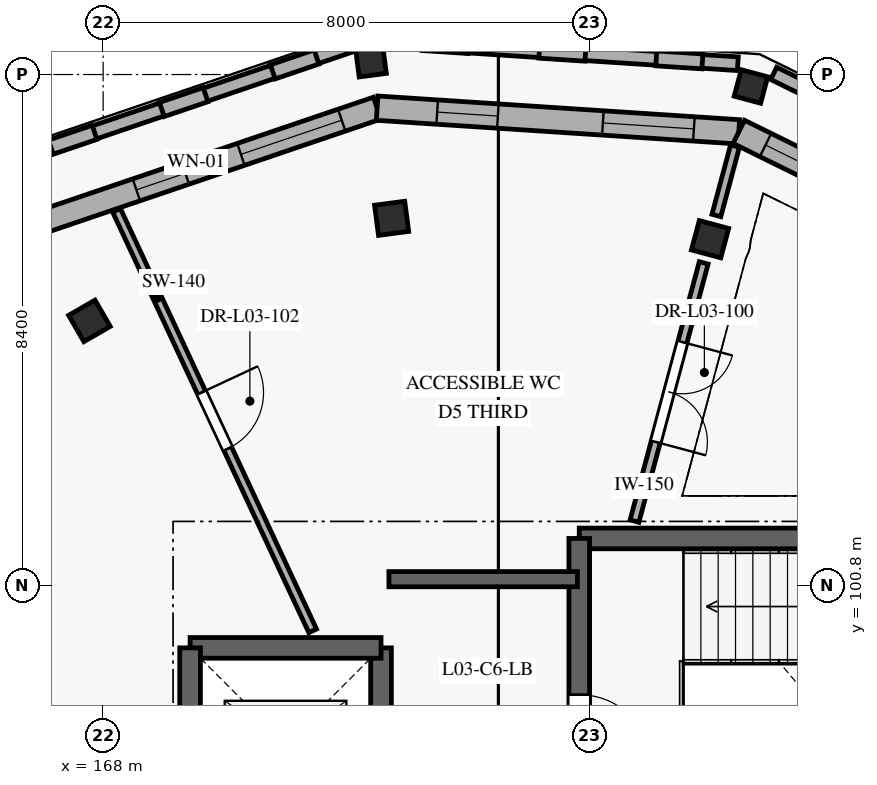
"""IFC4 building model, lengths in metres.
Left out: names, types, materials, properties, quantities, classifications, styles, units other than length and angle.
Written with IfcOpenShell. Run it as: python <this file> out.ifc"""

import sys

from ifc_helpers import new_model, si_unit, direction, frame, frame_2d, origin, origin_2d, place, context, subcontext, project, spatial, rectangle, extrude, element, fill, save


model = new_model("IFC4")
c1 = context("Model", 3, precision=1e-05, world=origin(), true_north=direction((0.0, 1.0)))
c2 = subcontext(c1, "Body", "Model", "MODEL_VIEW")
j1 = project(units=[si_unit("LENGTHUNIT", "METRE"), si_unit("PLANEANGLEUNIT", "RADIAN")], contexts=[c1])
p1 = place(None, origin())
s1 = spatial("IfcSite", under=j1, at=p1, CompositionType="ELEMENT")
p2 = place(p1, origin())
s2 = spatial("IfcBuilding", under=s1, at=p2, CompositionType="ELEMENT")
p3 = place(p2, frame((0.0, 0.0, 12.6)))
s3 = spatial("IfcBuildingStorey", under=s2, at=p3, CompositionType="ELEMENT", Elevation=12.6)
for number, where, z_axis, x_axis in (
    (1, (178.654, 109.003, 0.0), (0.0, 0.0, 1.0), (-0.966, 0.259, 0.0)),
    (2, (172.405, 109.413, 0.0), (0.0, 0.0, 1.0), (-0.991, -0.131, 0.0)),
):
    element("IfcColumn", number, at=place(p3, frame(where, z_axis=z_axis, x_axis=x_axis)), inside=s3, PredefinedType="COLUMN", context=c2, shape_type="SweptSolid", body=[
        extrude(rectangle(XDim=0.45, YDim=0.45, at=origin_2d()), origin(), (0.0, 0.0, 1.0), 4.2),
    ])
for number, where, z_axis, x_axis in (
    (3, (177.981, 106.492, 0.0), (0.0, 0.0, 1.0), (-0.966, 0.259, 0.0)),
    (4, (172.744, 106.835, 0.0), (0.0, 0.0, 1.0), (-0.991, -0.131, 0.0)),
    (5, (167.775, 105.148, 0.0), (0.0, 0.0, 1.0), (-0.866, -0.5, 0.0)),
):
    element("IfcColumn", number, at=place(p3, frame(where, z_axis=z_axis, x_axis=x_axis)), inside=s3, PredefinedType="COLUMN", context=c2, shape_type="SweptSolid", body=[
        extrude(rectangle(XDim=0.5, YDim=0.5, at=origin_2d()), origin(), (0.0, 0.0, 1.0), 4.2),
    ])
p4 = place(p3, frame((166.861, 106.731, 0.0), z_axis=(0.0, 0.0, 1.0), x_axis=(0.94693663561, 0.321420298269, 0.0)))
e6 = element("IfcWall", 6, at=p4, inside=s3, PredefinedType="SOLIDWALL", context=c2, shape_type="SweptSolid", body=[
    extrude(rectangle(XDim=5.961, YDim=0.38, at=frame_2d((2.98, 0.0))), origin(), (0.0, 0.0, 1.0), 3.94),
])
p5 = place(p4, frame((1.781, 0.0, 0.85)))
e7 = element("IfcOpeningElement", 7, at=p5, cuts=e6, PredefinedType="OPENING", context=c2, shape_type="SweptSolid", body=[
    extrude(rectangle(XDim=0.85, YDim=1.4, at=frame_2d((0.425, 0.7))), frame((0.0, 0.2, 0.0), z_axis=(0.0, -1.0, 0.0), x_axis=(1.0, 0.0, 0.0)), (0.0, 0.0, 1.0), 0.4),
])
p6 = place(p4, frame((3.596, 0.0, 0.85)))
e8 = element("IfcOpeningElement", 8, at=p6, cuts=e6, PredefinedType="OPENING", context=c2, shape_type="SweptSolid", body=[
    extrude(rectangle(XDim=1.75, YDim=1.3, at=frame_2d((0.875, 0.65))), frame((0.0, 0.2, 0.0), z_axis=(0.0, -1.0, 0.0), x_axis=(1.0, 0.0, 0.0)), (0.0, 0.0, 1.0), 0.4),
])
p7 = place(p3, frame((172.506, 108.647, 0.0), z_axis=(0.0, 0.0, 1.0), x_axis=(0.997858658418, -0.065407169492, 0.0)))
e9 = element("IfcWall", 9, at=p7, inside=s3, PredefinedType="SOLIDWALL", context=c2, shape_type="SweptSolid", body=[
    extrude(rectangle(XDim=5.961, YDim=0.4, at=frame_2d((2.98, 0.0))), origin(), (0.0, 0.0, 1.0), 3.94),
])
p8 = place(p7, frame((0.99, 0.0, 0.85)))
e10 = element("IfcOpeningElement", 10, at=p8, cuts=e9, PredefinedType="OPENING", context=c2, shape_type="SweptSolid", body=[
    extrude(rectangle(XDim=1.0, YDim=1.3, at=frame_2d((0.5, 0.65))), frame((0.0, 0.21, 0.0), z_axis=(0.0, -1.0, 0.0), x_axis=(1.0, 0.0, 0.0)), (0.0, 0.0, 1.0), 0.42),
])
p9 = place(p7, frame((3.721, 0.0, 0.85)))
e11 = element("IfcOpeningElement", 11, at=p9, cuts=e9, PredefinedType="OPENING", context=c2, shape_type="SweptSolid", body=[
    extrude(rectangle(XDim=1.5, YDim=1.3, at=frame_2d((0.75, 0.65))), frame((0.0, 0.21, 0.0), z_axis=(0.0, -1.0, 0.0), x_axis=(1.0, 0.0, 0.0)), (0.0, 0.0, 1.0), 0.42),
])
p10 = place(p3, frame((178.454, 108.257, 0.0), z_axis=(0.0, 0.0, 1.0), x_axis=(0.896879104746, -0.442275786664, 0.0)))
e12 = element("IfcWall", 12, at=p10, inside=s3, PredefinedType="SOLIDWALL", context=c2, shape_type="SweptSolid", body=[
    extrude(rectangle(XDim=5.961, YDim=0.425, at=frame_2d((2.98, 0.0))), origin(), (0.0, 0.0, 1.0), 3.94),
])
p11 = place(p10, frame((0.49, 0.0, 0.85)))
e13 = element("IfcOpeningElement", 13, at=p11, cuts=e12, PredefinedType="OPENING", context=c2, shape_type="SweptSolid", body=[
    extrude(rectangle(XDim=2.0, YDim=1.3, at=frame_2d((1.0, 0.65))), frame((0.0, 0.222, 0.0), z_axis=(0.0, -1.0, 0.0), x_axis=(1.0, 0.0, 0.0)), (0.0, 0.0, 1.0), 0.445),
])
p12 = place(p10, frame((3.346, 0.0, 0.85)))
e14 = element("IfcOpeningElement", 14, at=p12, cuts=e12, PredefinedType="OPENING", context=c2, shape_type="SweptSolid", body=[
    extrude(rectangle(XDim=2.25, YDim=1.3, at=frame_2d((1.125, 0.65))), frame((0.0, 0.222, 0.0), z_axis=(0.0, -1.0, 0.0), x_axis=(1.0, 0.0, 0.0)), (0.0, 0.0, 1.0), 0.445),
])
p13 = place(p3, frame((184.215, 106.662, 0.0), z_axis=(0.0, 0.0, 1.0), x_axis=(-0.896862382364, 0.442309695915, 0.0)))
e15 = element("IfcWall", 15, at=p13, inside=s3, PredefinedType="ELEMENTEDWALL", context=c2, shape_type="SweptSolid", body=[
    extrude(rectangle(XDim=5.783, YDim=0.225, at=frame_2d((2.892, 0.0))), origin(), (0.0, 0.0, 1.0), 1.09),
])
p14 = place(p3, frame((178.438, 109.377, 0.0), z_axis=(0.0, 0.0, 1.0), x_axis=(-0.997859072584, 0.065400850615, 0.0)))
e16 = element("IfcWall", 16, at=p14, inside=s3, PredefinedType="ELEMENTEDWALL", context=c2, shape_type="SweptSolid", body=[
    extrude(rectangle(XDim=5.782, YDim=0.225, at=frame_2d((2.891, 0.0))), origin(), (0.0, 0.0, 1.0), 1.09),
])
for number, where, z_axis, x_axis in (
    (17, (177.855, 109.416, 1.09), (0.0, 0.0, 1.0), (-0.998, 0.065, 0.0)),
    (18, (175.932, 109.542, 1.09), (0.0, 0.0, 1.0), (-0.998, 0.066, 0.0)),
    (19, (174.009, 109.668, 1.09), (0.0, 0.0, 1.0), (-0.998, 0.066, 0.0)),
):
    element("IfcWall", number, at=place(p3, frame(where, z_axis=z_axis, x_axis=x_axis)), inside=s3, PredefinedType="ELEMENTEDWALL", context=c2, shape_type="SweptSolid", body=[
        extrude(rectangle(XDim=0.76, YDim=0.245, at=frame_2d((0.38, 0.0))), origin(), (0.0, 0.0, 1.0), 2.85),
    ])
p15 = place(p3, frame((172.062, 109.676, 0.0), z_axis=(0.0, 0.0, 1.0), x_axis=(-0.946942218197, -0.321403850935, 0.0)))
e20 = element("IfcWall", 20, at=p15, inside=s3, PredefinedType="ELEMENTEDWALL", context=c2, shape_type="SweptSolid", body=[
    extrude(rectangle(XDim=5.782, YDim=0.225, at=frame_2d((2.891, 0.0))), origin(), (0.0, 0.0, 1.0), 1.09),
])
for number, where, z_axis, x_axis in (
    (21, (171.51, 109.488, 1.09), (0.0, 0.0, 1.0), (-0.947, -0.322, 0.0)),
    (22, (169.684, 108.869, 1.09), (0.0, 0.0, 1.0), (-0.947, -0.321, 0.0)),
    (23, (167.859, 108.249, 1.09), (0.0, 0.0, 1.0), (-0.947, -0.322, 0.0)),
):
    element("IfcWall", number, at=place(p3, frame(where, z_axis=z_axis, x_axis=x_axis)), inside=s3, PredefinedType="ELEMENTEDWALL", context=c2, shape_type="SweptSolid", body=[
        extrude(rectangle(XDim=0.76, YDim=0.245, at=frame_2d((0.38, 0.0))), origin(), (0.0, 0.0, 1.0), 2.85),
    ])
p16 = place(p3, frame((182.77, 101.57, 0.0), z_axis=(0.0, 0.0, 1.0), x_axis=(-1.0, 0.0, 0.0)))
e24 = element("IfcWall", 24, at=p16, inside=s3, PredefinedType="SHEAR", context=c2, shape_type="SweptSolid", body=[
    extrude(rectangle(XDim=6.94, YDim=0.34, at=frame_2d((3.47, 0.0))), origin(), (0.0, 0.0, 1.0), 3.95),
])
p17 = place(p3, frame((175.83, 101.57, 0.0), z_axis=(0.0, 0.0, 1.0), x_axis=(0.0, -1.0, 0.0)))
e25 = element("IfcWall", 25, at=p17, inside=s3, PredefinedType="SHEAR", context=c2, shape_type="SweptSolid", body=[
    extrude(rectangle(XDim=6.34, YDim=0.34, at=frame_2d((3.17, 0.0))), origin(), (0.0, 0.0, 1.0), 3.95),
])
p18 = place(p17, frame((2.57, 0.0, 0.0)))
e26 = element("IfcOpeningElement", 26, at=p18, cuts=e25, PredefinedType="OPENING", context=c2, shape_type="SweptSolid", body=[
    extrude(rectangle(XDim=1.2, YDim=2.1, at=frame_2d((0.6, 1.05))), frame((0.0, 0.18, 0.0), z_axis=(0.0, -1.0, 0.0), x_axis=(1.0, 0.0, 0.0)), (0.0, 0.0, 1.0), 0.36),
])
p19 = place(p3, frame((172.57, 96.63, 0.0), z_axis=(0.0, 0.0, 1.0), x_axis=(0.0, 1.0, 0.0)))
e27 = element("IfcWall", 27, at=p19, inside=s3, PredefinedType="SHEAR", context=c2, shape_type="SweptSolid", body=[
    extrude(rectangle(XDim=3.14, YDim=0.34, at=frame_2d((1.57, 0.0))), origin(), (0.0, 0.0, 1.0), 3.95),
])
p20 = place(p19, frame((1.02, 0.0, 0.0)))
e28 = element("IfcOpeningElement", 28, at=p20, cuts=e27, PredefinedType="OPENING", context=c2, shape_type="SweptSolid", body=[
    extrude(rectangle(XDim=1.1, YDim=2.1, at=frame_2d((0.55, 1.05))), frame((0.0, 0.18, 0.0), z_axis=(0.0, -1.0, 0.0), x_axis=(1.0, 0.0, 0.0)), (0.0, 0.0, 1.0), 0.36),
])
for number, where, z_axis, x_axis in (
    (29, (172.57, 99.77, 0.0), (0.0, 0.0, 1.0), (-1.0, 0.0, 0.0)),
    (30, (169.43, 99.77, 0.0), (0.0, 0.0, 1.0), (0.0, -1.0, 0.0)),
):
    element("IfcWall", number, at=place(p3, frame(where, z_axis=z_axis, x_axis=x_axis)), inside=s3, PredefinedType="SHEAR", context=c2, shape_type="SweptSolid", body=[
        extrude(rectangle(XDim=3.14, YDim=0.34, at=frame_2d((1.57, 0.0))), origin(), (0.0, 0.0, 1.0), 3.95),
    ])
p21 = place(p3, frame((175.8, 100.9, 0.0), z_axis=(0.0, 0.0, 1.0), x_axis=(-1.0, 0.0, 0.0)))
e31 = element("IfcWall", 31, at=p21, inside=s3, PredefinedType="SHEAR", context=c2, shape_type="SweptSolid", body=[
    extrude(rectangle(XDim=3.1, YDim=0.25, at=frame_2d((1.55, 0.0))), origin(), (0.0, 0.0, 1.0), 3.95),
])
p22 = place(p3, frame((178.392, 108.023, 0.0), z_axis=(0.0, 0.0, 1.0), x_axis=(-0.258884109648, -0.965908389948, 0.0)))
e32 = element("IfcWall", 32, at=p22, inside=s3, PredefinedType="PARTITIONING", context=c2, shape_type="SweptSolid", body=[
    extrude(rectangle(XDim=1.182, YDim=0.15, at=frame_2d((0.591, 0.0))), origin(), (0.0, 0.0, 1.0), 3.117),
])
p23 = place(p3, frame((177.877, 106.102, 0.0), z_axis=(0.0, 0.0, 1.0), x_axis=(-0.25879251633, -0.965932934262, 0.0)))
e33 = element("IfcWall", 33, at=p23, inside=s3, PredefinedType="PARTITIONING", context=c2, shape_type="SweptSolid", body=[
    extrude(rectangle(XDim=4.397, YDim=0.15, at=frame_2d((2.199, 0.0))), origin(), (0.0, 0.0, 1.0), 3.915),
])
p24 = place(p23, frame((1.348, 0.0, 0.0)))
e34 = element("IfcOpeningElement", 34, at=p24, cuts=e33, PredefinedType="OPENING", context=c2, shape_type="SweptSolid", body=[
    extrude(rectangle(XDim=1.7, YDim=2.18, at=frame_2d((0.85, 1.09))), frame((0.0, 0.085, 0.0), z_axis=(0.0, -1.0, 0.0), x_axis=(1.0, 0.0, 0.0)), (0.0, 0.0, 1.0), 0.17),
])
p25 = place(p3, frame((168.221, 106.966, 0.0), z_axis=(0.0, 0.0, 1.0), x_axis=(0.422627966587, -0.906303261529, 0.0)))
e35 = element("IfcWall", 35, at=p25, inside=s3, PredefinedType="PLUMBINGWALL", context=c2, shape_type="SweptSolid", body=[
    extrude(rectangle(XDim=7.63, YDim=0.14, at=frame_2d((3.815, 0.0))), origin(), (0.0, 0.0, 1.0), 3.915),
])
p26 = place(p25, frame((3.305, 0.0, 0.0)))
e36 = element("IfcOpeningElement", 36, at=p26, cuts=e35, PredefinedType="OPENING", context=c2, shape_type="SweptSolid", body=[
    extrude(rectangle(XDim=1.02, YDim=2.06, at=frame_2d((0.51, 1.03))), frame((0.0, 0.08, 0.0), z_axis=(0.0, -1.0, 0.0), x_axis=(1.0, 0.0, 0.0)), (0.0, 0.0, 1.0), 0.16),
])
p27 = place(p5, origin())
e37 = element("IfcWindow", 37, at=p27, inside=s3, PartitioningType="SINGLE_PANEL", PredefinedType="WINDOW", context=c2, shape_type="SweptSolid", body=[
    extrude(rectangle(XDim=0.85, YDim=1.4, at=frame_2d((0.425, 0.7))), frame((0.0, 0.03, 0.0), z_axis=(0.0, -1.0, 0.0), x_axis=(1.0, 0.0, 0.0)), (0.0, 0.0, 1.0), 0.06),
])
fill(e7, e37)
p28 = place(p6, origin())
e38 = element("IfcWindow", 38, at=p28, inside=s3, PartitioningType="SINGLE_PANEL", PredefinedType="WINDOW", context=c2, shape_type="SweptSolid", body=[
    extrude(rectangle(XDim=1.75, YDim=1.3, at=frame_2d((0.875, 0.65))), frame((0.0, 0.03, 0.0), z_axis=(0.0, -1.0, 0.0), x_axis=(1.0, 0.0, 0.0)), (0.0, 0.0, 1.0), 0.06),
])
fill(e8, e38)
p29 = place(p8, origin())
e39 = element("IfcWindow", 39, at=p29, inside=s3, PartitioningType="SINGLE_PANEL", PredefinedType="WINDOW", context=c2, shape_type="SweptSolid", body=[
    extrude(rectangle(XDim=1.0, YDim=1.3, at=frame_2d((0.5, 0.65))), frame((0.0, 0.03, 0.0), z_axis=(0.0, -1.0, 0.0), x_axis=(1.0, 0.0, 0.0)), (0.0, 0.0, 1.0), 0.06),
])
fill(e10, e39)
p30 = place(p9, origin())
e40 = element("IfcWindow", 40, at=p30, inside=s3, PartitioningType="SINGLE_PANEL", PredefinedType="WINDOW", context=c2, shape_type="SweptSolid", body=[
    extrude(rectangle(XDim=1.5, YDim=1.3, at=frame_2d((0.75, 0.65))), frame((0.0, 0.03, 0.0), z_axis=(0.0, -1.0, 0.0), x_axis=(1.0, 0.0, 0.0)), (0.0, 0.0, 1.0), 0.06),
])
fill(e11, e40)
p31 = place(p11, origin())
e41 = element("IfcWindow", 41, at=p31, inside=s3, PartitioningType="SINGLE_PANEL", PredefinedType="WINDOW", context=c2, shape_type="SweptSolid", body=[
    extrude(rectangle(XDim=2.0, YDim=1.3, at=frame_2d((1.0, 0.65))), frame((0.0, 0.03, 0.0), z_axis=(0.0, -1.0, 0.0), x_axis=(1.0, 0.0, 0.0)), (0.0, 0.0, 1.0), 0.06),
])
fill(e13, e41)
p32 = place(p18, origin())
e42 = element("IfcDoor", 42, at=p32, inside=s3, OperationType="SINGLE_SWING_RIGHT", PredefinedType="DOOR", context=c2, shape_type="SweptSolid", body=[
    extrude(rectangle(XDim=1.2, YDim=2.1, at=frame_2d((0.6, 1.05))), frame((0.0, 0.025, 0.0), z_axis=(0.0, -1.0, 0.0), x_axis=(1.0, 0.0, 0.0)), (0.0, 0.0, 1.0), 0.05),
])
fill(e26, e42)
p33 = place(p24, origin())
e43 = element("IfcDoor", 43, at=p33, inside=s3, OperationType="DOUBLE_DOOR_SINGLE_SWING", PredefinedType="DOOR", context=c2, shape_type="SweptSolid", body=[
    extrude(rectangle(XDim=1.7, YDim=2.18, at=frame_2d((0.85, 1.09))), frame((0.0, 0.025, 0.0), z_axis=(0.0, -1.0, 0.0), x_axis=(1.0, 0.0, 0.0)), (0.0, 0.0, 1.0), 0.05),
])
fill(e34, e43)
p34 = place(p26, frame((1.02, 0.0, 0.0), z_axis=(0.0, 0.0, 1.0), x_axis=(-1.0, 0.0, 0.0)))
e44 = element("IfcDoor", 44, at=p34, inside=s3, OperationType="SINGLE_SWING_LEFT", PredefinedType="DOOR", context=c2, shape_type="SweptSolid", body=[
    extrude(rectangle(XDim=1.02, YDim=2.06, at=frame_2d((0.51, 1.03))), frame((0.0, 0.025, 0.0), z_axis=(0.0, -1.0, 0.0), x_axis=(1.0, 0.0, 0.0)), (0.0, 0.0, 1.0), 0.05),
])
fill(e36, e44)
save(model, sys.argv[1])
